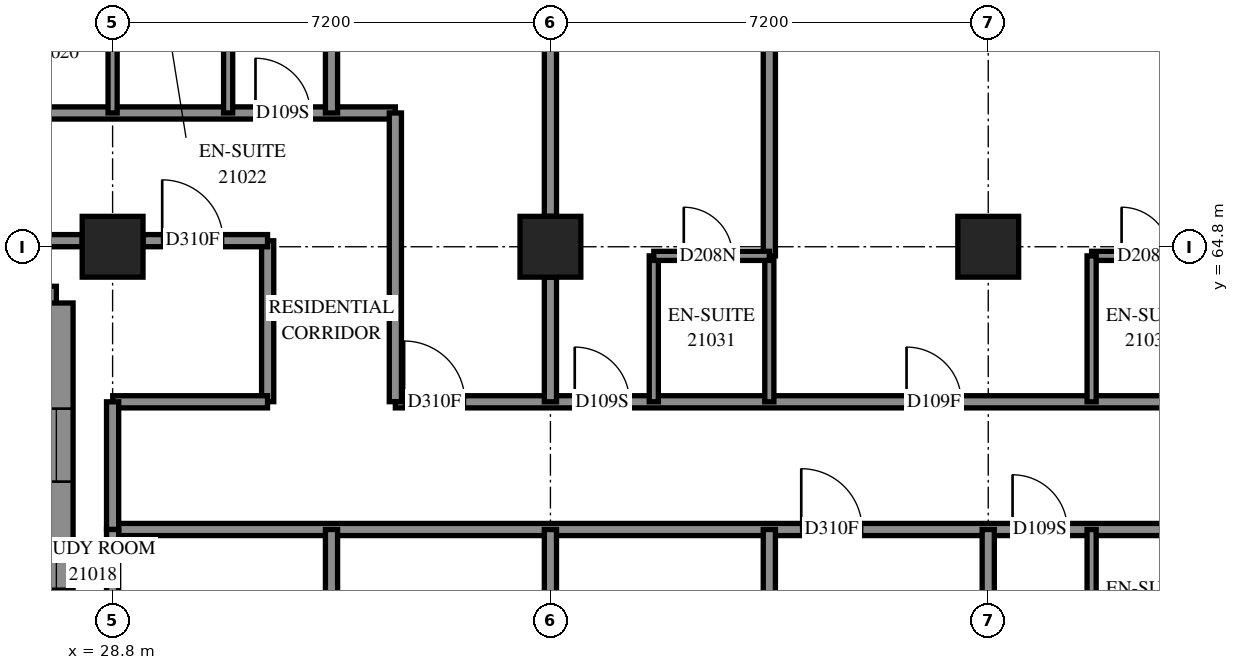
"""IFC4 building model, lengths in metres.
Left out: names, types, materials, properties, quantities, classifications, styles, units other than length and angle.
Written with IfcOpenShell. Run it as: python <this file> out.ifc"""

import sys

from ifc_helpers import new_model, si_unit, direction, frame, frame_2d, origin, origin_2d, place, context, subcontext, project, spatial, polyline, rectangle, outline, extrude, element, fill, save


model = new_model("IFC4")
c1 = context("Model", 3, precision=1e-05, world=origin(), true_north=direction((0.0, 1.0)))
c2 = subcontext(c1, "Body", "Model", "MODEL_VIEW")
j1 = project(units=[si_unit("LENGTHUNIT", "METRE"), si_unit("PLANEANGLEUNIT", "RADIAN")], contexts=[c1])
p1 = place(None, origin())
s1 = spatial("IfcSite", under=j1, at=p1, CompositionType="ELEMENT")
p2 = place(p1, origin())
s2 = spatial("IfcBuilding", under=s1, at=p2, CompositionType="ELEMENT")
p3 = place(p2, frame((0.0, 0.0, 81.2)))
s3 = spatial("IfcBuildingStorey", under=s2, at=p3, CompositionType="ELEMENT", Elevation=81.2)
for number, where, z_axis, x_axis in (
    (1, (28.8, 64.8, 0.0), (0.0, 0.0, 1.0), (1.0, 0.0, 0.0)),
    (2, (36.0, 64.8, 0.0), (0.0, 0.0, 1.0), (1.0, 0.0, 0.0)),
    (3, (43.2, 64.8, 0.0), (0.0, 0.0, 1.0), (1.0, 0.0, 0.0)),
):
    element("IfcColumn", number, at=place(p3, frame(where, z_axis=z_axis, x_axis=x_axis)), inside=s3, PredefinedType="COLUMN", context=c2, shape_type="SweptSolid", body=[
        extrude(rectangle(XDim=1.0, YDim=1.0, at=origin_2d()), origin(), (0.0, 0.0, 1.0), 3.1),
    ])
p4 = place(p3, frame((19.775, 63.875, 0.0), z_axis=(0.0, 0.0, 1.0), x_axis=(1.0, 0.0, 0.0)))
e4 = element("IfcWall", 4, at=p4, inside=s3, PredefinedType="SOLIDWALL", context=c2, shape_type="SweptSolid", body=[
    extrude(outline(polyline([(-0.275, -0.275), (7.825, -0.275), (8.375, 0.275), (0.275, 0.275), (-0.275, -0.275)])), origin(), (0.0, 0.0, 1.0), 3.1),
])
p5 = place(p4, frame((1.975, 0.0, 0.5)))
e5 = element("IfcOpeningElement", 5, at=p5, cuts=e4, PredefinedType="OPENING", context=c2, shape_type="SweptSolid", body=[
    extrude(rectangle(XDim=1.3, YDim=2.45, at=frame_2d((0.65, 1.225))), frame((0.0, 0.285, 0.0), z_axis=(0.0, -1.0, 0.0), x_axis=(1.0, 0.0, 0.0)), (0.0, 0.0, 1.0), 0.57),
])
p6 = place(p4, frame((3.475, 0.0, 0.5)))
e6 = element("IfcOpeningElement", 6, at=p6, cuts=e4, PredefinedType="OPENING", context=c2, shape_type="SweptSolid", body=[
    extrude(rectangle(XDim=1.3, YDim=2.45, at=frame_2d((0.65, 1.225))), frame((0.0, 0.285, 0.0), z_axis=(0.0, -1.0, 0.0), x_axis=(1.0, 0.0, 0.0)), (0.0, 0.0, 1.0), 0.57),
])
p7 = place(p4, frame((6.062, 0.0, 0.5)))
e7 = element("IfcOpeningElement", 7, at=p7, cuts=e4, PredefinedType="OPENING", context=c2, shape_type="SweptSolid", body=[
    extrude(rectangle(XDim=1.2, YDim=2.45, at=frame_2d((0.6, 1.225))), frame((0.0, 0.285, 0.0), z_axis=(0.0, -1.0, 0.0), x_axis=(1.0, 0.0, 0.0)), (0.0, 0.0, 1.0), 0.57),
])
p8 = place(p3, frame((27.875, 63.875, 0.0), z_axis=(0.0, 0.0, 1.0), x_axis=(0.0, -1.0, 0.0)))
e8 = element("IfcWall", 8, at=p8, inside=s3, PredefinedType="SOLIDWALL", context=c2, shape_type="SweptSolid", body=[
    extrude(outline(polyline([(0.275, -0.275), (8.375, -0.275), (7.825, 0.275), (-0.275, 0.275), (0.275, -0.275)])), origin(), (0.0, 0.0, 1.0), 3.1),
])
p9 = place(p8, frame((4.825, 0.0, 0.5)))
e9 = element("IfcOpeningElement", 9, at=p9, cuts=e8, PredefinedType="OPENING", context=c2, shape_type="SweptSolid", body=[
    extrude(rectangle(XDim=1.3, YDim=2.45, at=frame_2d((0.65, 1.225))), frame((0.0, 0.285, 0.0), z_axis=(0.0, -1.0, 0.0), x_axis=(1.0, 0.0, 0.0)), (0.0, 0.0, 1.0), 0.57),
])
p10 = place(p8, frame((1.738, 0.0, 0.5)))
e10 = element("IfcOpeningElement", 10, at=p10, cuts=e8, PredefinedType="OPENING", context=c2, shape_type="SweptSolid", body=[
    extrude(rectangle(XDim=1.2, YDim=2.45, at=frame_2d((0.6, 1.225))), frame((0.0, 0.285, 0.0), z_axis=(0.0, -1.0, 0.0), x_axis=(1.0, 0.0, 0.0)), (0.0, 0.0, 1.0), 0.57),
])
p11 = place(p8, frame((3.9, 0.0, 0.45)))
e11 = element("IfcOpeningElement", 11, at=p11, cuts=e8, PredefinedType="OPENING", context=c2, shape_type="SweptSolid", body=[
    extrude(rectangle(XDim=0.8, YDim=2.5, at=frame_2d((0.4, 1.25))), frame((0.0, 0.285, 0.0), z_axis=(0.0, -1.0, 0.0), x_axis=(1.0, 0.0, 0.0)), (0.0, 0.0, 1.0), 0.57),
])
p12 = place(p3, frame((28.8, 60.15, 0.0), z_axis=(0.0, 0.0, 1.0), x_axis=(1.0, 0.0, 0.0)))
e12 = element("IfcWall", 12, at=p12, inside=s3, PredefinedType="PARTITIONING", context=c2, shape_type="SweptSolid", body=[
    extrude(rectangle(XDim=24.15, YDim=0.2, at=frame_2d((12.075, 0.0))), origin(), (0.0, 0.0, 1.0), 3.1),
])
p13 = place(p12, frame((11.325, 0.0, 0.0)))
e13 = element("IfcOpeningElement", 13, at=p13, cuts=e12, PredefinedType="OPENING", context=c2, shape_type="SweptSolid", body=[
    extrude(rectangle(XDim=1.0, YDim=2.1, at=frame_2d((0.5, 1.05))), frame((0.0, 0.11, 0.0), z_axis=(0.0, -1.0, 0.0), x_axis=(1.0, 0.0, 0.0)), (0.0, 0.0, 1.0), 0.22),
])
p14 = place(p12, frame((14.8, 0.0, 0.0)))
e14 = element("IfcOpeningElement", 14, at=p14, cuts=e12, PredefinedType="OPENING", context=c2, shape_type="SweptSolid", body=[
    extrude(rectangle(XDim=0.9, YDim=2.1, at=frame_2d((0.45, 1.05))), frame((0.0, 0.11, 0.0), z_axis=(0.0, -1.0, 0.0), x_axis=(1.0, 0.0, 0.0)), (0.0, 0.0, 1.0), 0.22),
])
p15 = place(p12, frame((18.508, 0.0, 0.0)))
e15 = element("IfcOpeningElement", 15, at=p15, cuts=e12, PredefinedType="OPENING", context=c2, shape_type="SweptSolid", body=[
    extrude(rectangle(XDim=1.0, YDim=2.1, at=frame_2d((0.5, 1.05))), frame((0.0, 0.11, 0.0), z_axis=(0.0, -1.0, 0.0), x_axis=(1.0, 0.0, 0.0)), (0.0, 0.0, 1.0), 0.22),
])
p16 = place(p12, frame((22.882, 0.0, 0.0)))
e16 = element("IfcOpeningElement", 16, at=p16, cuts=e12, PredefinedType="OPENING", context=c2, shape_type="SweptSolid", body=[
    extrude(rectangle(XDim=1.0, YDim=2.1, at=frame_2d((0.5, 1.05))), frame((0.0, 0.11, 0.0), z_axis=(0.0, -1.0, 0.0), x_axis=(1.0, 0.0, 0.0)), (0.0, 0.0, 1.0), 0.22),
])
p17 = place(p3, frame((33.45, 62.25, 0.0), z_axis=(0.0, 0.0, 1.0), x_axis=(1.0, 0.0, 0.0)))
e17 = element("IfcWall", 17, at=p17, inside=s3, PredefinedType="PARTITIONING", context=c2, shape_type="SweptSolid", body=[
    extrude(rectangle(XDim=21.85, YDim=0.2, at=frame_2d((10.925, 0.0))), origin(), (0.0, 0.0, 1.0), 3.1),
])
p18 = place(p17, frame((0.144, 0.0, 0.0)))
e18 = element("IfcOpeningElement", 18, at=p18, cuts=e17, PredefinedType="OPENING", context=c2, shape_type="SweptSolid", body=[
    extrude(rectangle(XDim=1.0, YDim=2.1, at=frame_2d((0.5, 1.05))), frame((0.0, 0.11, 0.0), z_axis=(0.0, -1.0, 0.0), x_axis=(1.0, 0.0, 0.0)), (0.0, 0.0, 1.0), 0.22),
])
p19 = place(p17, frame((2.95, 0.0, 0.0)))
e19 = element("IfcOpeningElement", 19, at=p19, cuts=e17, PredefinedType="OPENING", context=c2, shape_type="SweptSolid", body=[
    extrude(rectangle(XDim=0.9, YDim=2.1, at=frame_2d((0.45, 1.05))), frame((0.0, 0.11, 0.0), z_axis=(0.0, -1.0, 0.0), x_axis=(1.0, 0.0, 0.0)), (0.0, 0.0, 1.0), 0.22),
])
p20 = place(p17, frame((8.407, 0.0, 0.0)))
e20 = element("IfcOpeningElement", 20, at=p20, cuts=e17, PredefinedType="OPENING", context=c2, shape_type="SweptSolid", body=[
    extrude(rectangle(XDim=0.9, YDim=2.1, at=frame_2d((0.45, 1.05))), frame((0.0, 0.11, 0.0), z_axis=(0.0, -1.0, 0.0), x_axis=(1.0, 0.0, 0.0)), (0.0, 0.0, 1.0), 0.22),
])
p21 = place(p17, frame((15.7, 0.0, 0.0)))
e21 = element("IfcOpeningElement", 21, at=p21, cuts=e17, PredefinedType="OPENING", context=c2, shape_type="SweptSolid", body=[
    extrude(rectangle(XDim=0.9, YDim=2.1, at=frame_2d((0.45, 1.05))), frame((0.0, 0.11, 0.0), z_axis=(0.0, -1.0, 0.0), x_axis=(1.0, 0.0, 0.0)), (0.0, 0.0, 1.0), 0.22),
])
p22 = place(p17, frame((17.35, 0.0, 0.0)))
e22 = element("IfcOpeningElement", 22, at=p22, cuts=e17, PredefinedType="OPENING", context=c2, shape_type="SweptSolid", body=[
    extrude(rectangle(XDim=0.9, YDim=2.1, at=frame_2d((0.45, 1.05))), frame((0.0, 0.11, 0.0), z_axis=(0.0, -1.0, 0.0), x_axis=(1.0, 0.0, 0.0)), (0.0, 0.0, 1.0), 0.22),
])
p23 = place(p3, frame((21.602, 67.0, 0.0), z_axis=(0.0, 0.0, 1.0), x_axis=(1.0, 0.0, 0.0)))
e23 = element("IfcWall", 23, at=p23, inside=s3, PredefinedType="PARTITIONING", context=c2, shape_type="SweptSolid", body=[
    extrude(rectangle(XDim=11.848, YDim=0.2, at=frame_2d((5.924, 0.0))), origin(), (0.0, 0.0, 1.0), 3.1),
])
p24 = place(p23, frame((1.791, 0.0, 0.0)))
e24 = element("IfcOpeningElement", 24, at=p24, cuts=e23, PredefinedType="OPENING", context=c2, shape_type="SweptSolid", body=[
    extrude(rectangle(XDim=1.0, YDim=2.1, at=frame_2d((0.5, 1.05))), frame((0.0, 0.11, 0.0), z_axis=(0.0, -1.0, 0.0), x_axis=(1.0, 0.0, 0.0)), (0.0, 0.0, 1.0), 0.22),
])
p25 = place(p23, frame((3.998, 0.0, 0.0)))
e25 = element("IfcOpeningElement", 25, at=p25, cuts=e23, PredefinedType="OPENING", context=c2, shape_type="SweptSolid", body=[
    extrude(rectangle(XDim=0.9, YDim=2.1, at=frame_2d((0.45, 1.05))), frame((0.0, 0.11, 0.0), z_axis=(0.0, -1.0, 0.0), x_axis=(1.0, 0.0, 0.0)), (0.0, 0.0, 1.0), 0.22),
])
p26 = place(p23, frame((9.548, 0.0, 0.0)))
e26 = element("IfcOpeningElement", 26, at=p26, cuts=e23, PredefinedType="OPENING", context=c2, shape_type="SweptSolid", body=[
    extrude(rectangle(XDim=0.9, YDim=2.1, at=frame_2d((0.45, 1.05))), frame((0.0, 0.11, 0.0), z_axis=(0.0, -1.0, 0.0), x_axis=(1.0, 0.0, 0.0)), (0.0, 0.0, 1.0), 0.22),
])
p27 = place(p3, frame((39.6, 64.65, 0.0), z_axis=(0.0, 0.0, 1.0), x_axis=(0.0, 1.0, 0.0)))
e27 = element("IfcWall", 27, at=p27, inside=s3, PredefinedType="PARTITIONING", context=c2, shape_type="SweptSolid", body=[
    extrude(rectangle(XDim=8.091, YDim=0.2, at=frame_2d((4.046, 0.0))), origin(), (0.0, 0.0, 1.0), 3.1),
])
p28 = place(p3, frame((36.0, 65.3, 0.0), z_axis=(0.0, 0.0, 1.0), x_axis=(0.0, 1.0, 0.0)))
e28 = element("IfcWall", 28, at=p28, inside=s3, PredefinedType="PARTITIONING", context=c2, shape_type="SweptSolid", body=[
    extrude(rectangle(XDim=6.2, YDim=0.2, at=frame_2d((3.1, 0.0))), origin(), (0.0, 0.0, 1.0), 3.1),
])
p29 = place(p3, frame((22.1, 64.9, 0.0), z_axis=(0.0, 0.0, 1.0), x_axis=(1.0, 0.0, 0.0)))
e29 = element("IfcWall", 29, at=p29, inside=s3, PredefinedType="PARTITIONING", context=c2, shape_type="SweptSolid", body=[
    extrude(rectangle(XDim=6.2, YDim=0.2, at=frame_2d((3.1, 0.0))), origin(), (0.0, 0.0, 1.0), 2.6),
])
p30 = place(p3, frame((32.4, 67.0, 0.0), z_axis=(0.0, 0.0, 1.0), x_axis=(0.0, 1.0, 0.0)))
e30 = element("IfcWall", 30, at=p30, inside=s3, PredefinedType="PARTITIONING", context=c2, shape_type="SweptSolid", body=[
    extrude(rectangle(XDim=5.771, YDim=0.2, at=frame_2d((2.885, 0.0))), origin(), (0.0, 0.0, 1.0), 3.1),
])
p31 = place(p3, frame((33.45, 62.252, 0.0), z_axis=(0.0, 0.0, 1.0), x_axis=(0.0, 1.0, 0.0)))
e31 = element("IfcWall", 31, at=p31, inside=s3, PredefinedType="PARTITIONING", context=c2, shape_type="SweptSolid", body=[
    extrude(rectangle(XDim=4.748, YDim=0.2, at=frame_2d((2.374, 0.0))), origin(), (0.0, 0.0, 1.0), 3.1),
])
for number, where, z_axis, x_axis in (
    (32, (32.4, 56.05, 0.0), (0.0, 0.0, 1.0), (0.0, 1.0, 0.0)),
    (33, (39.6, 56.05, 0.0), (0.0, 0.0, 1.0), (0.0, 1.0, 0.0)),
):
    element("IfcWall", number, at=place(p3, frame(where, z_axis=z_axis, x_axis=x_axis)), inside=s3, PredefinedType="PARTITIONING", context=c2, shape_type="SweptSolid", body=[
        extrude(rectangle(XDim=4.1, YDim=0.2, at=frame_2d((2.05, 0.0))), origin(), (0.0, 0.0, 1.0), 3.1),
    ])
p32 = place(p3, frame((44.9, 64.65, 0.0), z_axis=(0.0, 0.0, 1.0), x_axis=(1.0, 0.0, 0.0)))
e34 = element("IfcWall", 34, at=p32, inside=s3, PredefinedType="PARTITIONING", context=c2, shape_type="SweptSolid", body=[
    extrude(rectangle(XDim=3.8, YDim=0.15, at=frame_2d((1.9, 0.0))), origin(), (0.0, 0.0, 1.0), 3.1),
])
p33 = place(p32, frame((0.493, 0.0, 0.0)))
e35 = element("IfcOpeningElement", 35, at=p33, cuts=e34, PredefinedType="OPENING", context=c2, shape_type="SweptSolid", body=[
    extrude(rectangle(XDim=0.8, YDim=2.1, at=frame_2d((0.4, 1.05))), frame((0.0, 0.085, 0.0), z_axis=(0.0, -1.0, 0.0), x_axis=(1.0, 0.0, 0.0)), (0.0, 0.0, 1.0), 0.17),
])
p34 = place(p32, frame((2.507, 0.0, 0.0)))
e36 = element("IfcOpeningElement", 36, at=p34, cuts=e34, PredefinedType="OPENING", context=c2, shape_type="SweptSolid", body=[
    extrude(rectangle(XDim=0.8, YDim=2.1, at=frame_2d((0.4, 1.05))), frame((0.0, 0.085, 0.0), z_axis=(0.0, -1.0, 0.0), x_axis=(1.0, 0.0, 0.0)), (0.0, 0.0, 1.0), 0.17),
])
p35 = place(p3, frame((31.35, 62.252, 0.0), z_axis=(0.0, 0.0, 1.0), x_axis=(0.0, 1.0, 0.0)))
e37 = element("IfcWall", 37, at=p35, inside=s3, PredefinedType="PARTITIONING", context=c2, shape_type="SweptSolid", body=[
    extrude(rectangle(XDim=2.646, YDim=0.2, at=frame_2d((1.323, 0.0))), origin(), (0.0, 0.0, 1.0), 3.1),
])
p36 = place(p3, frame((28.802, 62.25, 0.0), z_axis=(0.0, 0.0, 1.0), x_axis=(1.0, 0.0, 0.0)))
e38 = element("IfcWall", 38, at=p36, inside=s3, PredefinedType="PARTITIONING", context=c2, shape_type="SweptSolid", body=[
    extrude(rectangle(XDim=2.546, YDim=0.2, at=frame_2d((1.273, 0.0))), origin(), (0.0, 0.0, 1.0), 3.1),
])
for number, where, z_axis, x_axis in (
    (39, (28.8, 67.0, 0.0), (0.0, 0.0, 1.0), (0.0, 1.0, 0.0)),
    (40, (30.7, 67.0, 0.0), (0.0, 0.0, 1.0), (0.0, 1.0, 0.0)),
    (41, (37.7, 62.25, 0.0), (0.0, 0.0, 1.0), (0.0, 1.0, 0.0)),
    (42, (39.6, 62.25, 0.0), (0.0, 0.0, 1.0), (0.0, 1.0, 0.0)),
    (43, (44.9, 62.25, 0.0), (0.0, 0.0, 1.0), (0.0, 1.0, 0.0)),
    (44, (44.9, 57.75, 0.0), (0.0, 0.0, 1.0), (0.0, 1.0, 0.0)),
):
    element("IfcWall", number, at=place(p3, frame(where, z_axis=z_axis, x_axis=x_axis)), inside=s3, PredefinedType="PARTITIONING", context=c2, shape_type="SweptSolid", body=[
        extrude(rectangle(XDim=2.4, YDim=0.15, at=frame_2d((1.2, 0.0))), origin(), (0.0, 0.0, 1.0), 3.1),
    ])
p37 = place(p3, frame((28.8, 60.15, 0.0), z_axis=(0.0, 0.0, 1.0), x_axis=(0.0, 1.0, 0.0)))
e45 = element("IfcWall", 45, at=p37, inside=s3, PredefinedType="PARTITIONING", context=c2, shape_type="SweptSolid", body=[
    extrude(rectangle(XDim=2.1, YDim=0.2, at=frame_2d((1.05, 0.0))), origin(), (0.0, 0.0, 1.0), 2.6),
])
p38 = place(p3, frame((28.8, 58.1, 0.0), z_axis=(0.0, 0.0, 1.0), x_axis=(0.0, 1.0, 0.0)))
e46 = element("IfcWall", 46, at=p38, inside=s3, PredefinedType="PARTITIONING", context=c2, shape_type="SweptSolid", body=[
    extrude(rectangle(XDim=2.05, YDim=0.2, at=frame_2d((1.025, 0.0))), origin(), (0.0, 0.0, 1.0), 2.6),
])
for number, where, z_axis, x_axis in (
    (47, (36.0, 58.1, 0.0), (0.0, 0.0, 1.0), (0.0, 1.0, 0.0)),
    (48, (36.0, 62.25, 0.0), (0.0, 0.0, 1.0), (0.0, 1.0, 0.0)),
    (49, (43.2, 58.1, 0.0), (0.0, 0.0, 1.0), (0.0, 1.0, 0.0)),
):
    element("IfcWall", number, at=place(p3, frame(where, z_axis=z_axis, x_axis=x_axis)), inside=s3, PredefinedType="PARTITIONING", context=c2, shape_type="SweptSolid", body=[
        extrude(rectangle(XDim=2.05, YDim=0.2, at=frame_2d((1.025, 0.0))), origin(), (0.0, 0.0, 1.0), 3.1),
    ])
p39 = place(p3, frame((29.3, 64.9, 0.0), z_axis=(0.0, 0.0, 1.0), x_axis=(1.0, 0.0, 0.0)))
e50 = element("IfcWall", 50, at=p39, inside=s3, PredefinedType="PARTITIONING", context=c2, shape_type="SweptSolid", body=[
    extrude(rectangle(XDim=2.048, YDim=0.2, at=frame_2d((1.024, 0.0))), origin(), (0.0, 0.0, 1.0), 3.1),
])
p40 = place(p39, frame((0.316, 0.0, 0.0)))
e51 = element("IfcOpeningElement", 51, at=p40, cuts=e50, PredefinedType="OPENING", context=c2, shape_type="SweptSolid", body=[
    extrude(rectangle(XDim=1.0, YDim=2.1, at=frame_2d((0.5, 1.05))), frame((0.0, 0.11, 0.0), z_axis=(0.0, -1.0, 0.0), x_axis=(1.0, 0.0, 0.0)), (0.0, 0.0, 1.0), 0.22),
])
p41 = place(p3, frame((37.7, 64.65, 0.0), z_axis=(0.0, 0.0, 1.0), x_axis=(1.0, 0.0, 0.0)))
e52 = element("IfcWall", 52, at=p41, inside=s3, PredefinedType="PARTITIONING", context=c2, shape_type="SweptSolid", body=[
    extrude(rectangle(XDim=1.9, YDim=0.15, at=frame_2d((0.95, 0.0))), origin(), (0.0, 0.0, 1.0), 3.1),
])
p42 = place(p41, frame((0.493, 0.0, 0.0)))
e53 = element("IfcOpeningElement", 53, at=p42, cuts=e52, PredefinedType="OPENING", context=c2, shape_type="SweptSolid", body=[
    extrude(rectangle(XDim=0.8, YDim=2.1, at=frame_2d((0.4, 1.05))), frame((0.0, 0.085, 0.0), z_axis=(0.0, -1.0, 0.0), x_axis=(1.0, 0.0, 0.0)), (0.0, 0.0, 1.0), 0.17),
])
p43 = place(p10, origin())
e54 = element("IfcWindow", 54, at=p43, inside=s3, PartitioningType="SINGLE_PANEL", PredefinedType="WINDOW", context=c2, shape_type="SweptSolid", body=[
    extrude(rectangle(XDim=1.2, YDim=2.45, at=frame_2d((0.6, 1.225))), frame((0.0, 0.155, 0.0), z_axis=(0.0, -1.0, 0.0), x_axis=(1.0, 0.0, 0.0)), (0.0, 0.0, 1.0), 0.06),
])
fill(e10, e54)
p44 = place(p40, origin())
e55 = element("IfcDoor", 55, at=p44, inside=s3, OperationType="SINGLE_SWING_RIGHT", PredefinedType="DOOR", context=c2, shape_type="SweptSolid", body=[
    extrude(rectangle(XDim=1.0, YDim=2.1, at=frame_2d((0.5, 1.05))), frame((0.0, 0.025, 0.0), z_axis=(0.0, -1.0, 0.0), x_axis=(1.0, 0.0, 0.0)), (0.0, 0.0, 1.0), 0.05),
])
fill(e51, e55)
p45 = place(p26, origin())
e56 = element("IfcDoor", 56, at=p45, inside=s3, OperationType="SINGLE_SWING_RIGHT", PredefinedType="DOOR", context=c2, shape_type="SweptSolid", body=[
    extrude(rectangle(XDim=0.9, YDim=2.1, at=frame_2d((0.45, 1.05))), frame((0.0, 0.025, 0.0), z_axis=(0.0, -1.0, 0.0), x_axis=(1.0, 0.0, 0.0)), (0.0, 0.0, 1.0), 0.05),
])
fill(e26, e56)
p46 = place(p18, origin())
e57 = element("IfcDoor", 57, at=p46, inside=s3, OperationType="SINGLE_SWING_LEFT", PredefinedType="DOOR", context=c2, shape_type="SweptSolid", body=[
    extrude(rectangle(XDim=1.0, YDim=2.1, at=frame_2d((0.5, 1.05))), frame((0.0, 0.025, 0.0), z_axis=(0.0, -1.0, 0.0), x_axis=(1.0, 0.0, 0.0)), (0.0, 0.0, 1.0), 0.05),
])
fill(e18, e57)
p47 = place(p19, origin())
e58 = element("IfcDoor", 58, at=p47, inside=s3, OperationType="SINGLE_SWING_RIGHT", PredefinedType="DOOR", context=c2, shape_type="SweptSolid", body=[
    extrude(rectangle(XDim=0.9, YDim=2.1, at=frame_2d((0.45, 1.05))), frame((0.0, 0.025, 0.0), z_axis=(0.0, -1.0, 0.0), x_axis=(1.0, 0.0, 0.0)), (0.0, 0.0, 1.0), 0.05),
])
fill(e19, e58)
p48 = place(p42, origin())
e59 = element("IfcDoor", 59, at=p48, inside=s3, OperationType="SINGLE_SWING_RIGHT", PredefinedType="DOOR", context=c2, shape_type="SweptSolid", body=[
    extrude(rectangle(XDim=0.8, YDim=2.1, at=frame_2d((0.4, 1.05))), frame((0.0, 0.025, 0.0), z_axis=(0.0, -1.0, 0.0), x_axis=(1.0, 0.0, 0.0)), (0.0, 0.0, 1.0), 0.05),
])
fill(e53, e59)
p49 = place(p20, origin())
e60 = element("IfcDoor", 60, at=p49, inside=s3, OperationType="SINGLE_SWING_LEFT", PredefinedType="DOOR", context=c2, shape_type="SweptSolid", body=[
    extrude(rectangle(XDim=0.9, YDim=2.1, at=frame_2d((0.45, 1.05))), frame((0.0, 0.025, 0.0), z_axis=(0.0, -1.0, 0.0), x_axis=(1.0, 0.0, 0.0)), (0.0, 0.0, 1.0), 0.05),
])
fill(e20, e60)
p50 = place(p33, origin())
e61 = element("IfcDoor", 61, at=p50, inside=s3, OperationType="SINGLE_SWING_RIGHT", PredefinedType="DOOR", context=c2, shape_type="SweptSolid", body=[
    extrude(rectangle(XDim=0.8, YDim=2.1, at=frame_2d((0.4, 1.05))), frame((0.0, 0.025, 0.0), z_axis=(0.0, -1.0, 0.0), x_axis=(1.0, 0.0, 0.0)), (0.0, 0.0, 1.0), 0.05),
])
fill(e35, e61)
p51 = place(p13, origin())
e62 = element("IfcDoor", 62, at=p51, inside=s3, OperationType="SINGLE_SWING_RIGHT", PredefinedType="DOOR", context=c2, shape_type="SweptSolid", body=[
    extrude(rectangle(XDim=1.0, YDim=2.1, at=frame_2d((0.5, 1.05))), frame((0.0, 0.025, 0.0), z_axis=(0.0, -1.0, 0.0), x_axis=(1.0, 0.0, 0.0)), (0.0, 0.0, 1.0), 0.05),
])
fill(e13, e62)
p52 = place(p14, origin())
e63 = element("IfcDoor", 63, at=p52, inside=s3, OperationType="SINGLE_SWING_LEFT", PredefinedType="DOOR", context=c2, shape_type="SweptSolid", body=[
    extrude(rectangle(XDim=0.9, YDim=2.1, at=frame_2d((0.45, 1.05))), frame((0.0, 0.025, 0.0), z_axis=(0.0, -1.0, 0.0), x_axis=(1.0, 0.0, 0.0)), (0.0, 0.0, 1.0), 0.05),
])
fill(e14, e63)
p53 = place(p11, origin())
e64 = element("IfcWindow", 64, at=p53, inside=s3, PartitioningType="SINGLE_PANEL", PredefinedType="WINDOW", context=c2, shape_type="SweptSolid", body=[
    extrude(rectangle(XDim=0.8, YDim=2.5, at=frame_2d((0.4, 1.25))), frame((0.0, 0.155, 0.0), z_axis=(0.0, -1.0, 0.0), x_axis=(1.0, 0.0, 0.0)), (0.0, 0.0, 1.0), 0.06),
])
fill(e11, e64)
save(model, sys.argv[1])
